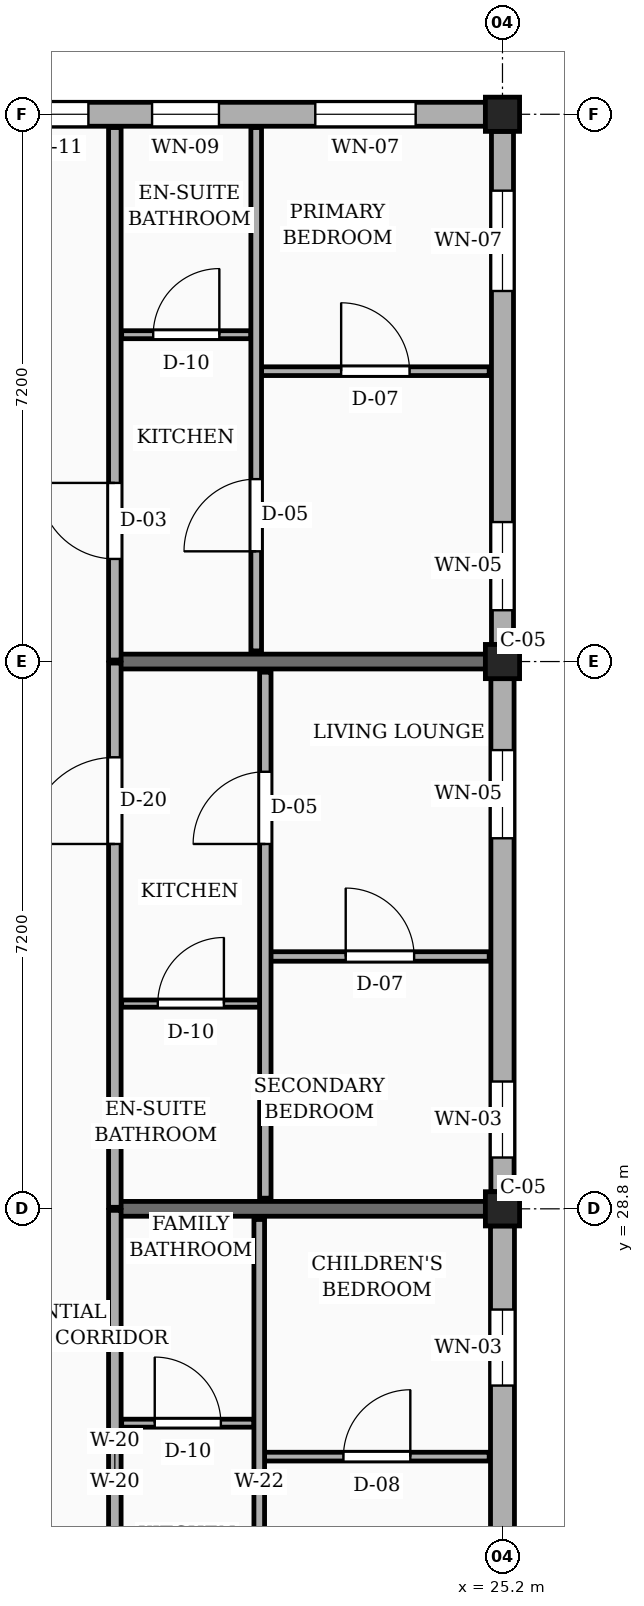
"""IFC4 building model, lengths in metres.
Left out: names, types, materials, properties, quantities, classifications, styles, units other than length and angle.
Written with IfcOpenShell. Run it as: python <this file> out.ifc"""

import sys

from ifc_helpers import new_model, si_unit, direction, frame, frame_2d, origin, origin_2d, place, context, subcontext, project, spatial, rectangle, extrude, element, fill, save


model = new_model("IFC4")
c1 = context("Model", 3, precision=1e-05, world=origin(), true_north=direction((0.0, 1.0)))
c2 = subcontext(c1, "Body", "Model", "MODEL_VIEW")
j1 = project(units=[si_unit("LENGTHUNIT", "METRE"), si_unit("PLANEANGLEUNIT", "RADIAN")], contexts=[c1])
p1 = place(None, origin())
s1 = spatial("IfcSite", under=j1, at=p1, CompositionType="ELEMENT")
p2 = place(p1, origin())
s2 = spatial("IfcBuilding", under=s1, at=p2, CompositionType="ELEMENT")
p3 = place(p2, frame((0.0, 0.0, 42.3)))
s3 = spatial("IfcBuildingStorey", under=s2, at=p3, CompositionType="ELEMENT", Elevation=42.3)
for number, where, z_axis, x_axis in (
    (1, (25.2, 28.8, 0.0), (0.0, 0.0, 1.0), (1.0, 0.0, 0.0)),
    (2, (25.2, 36.0, 0.0), (0.0, 0.0, 1.0), (1.0, 0.0, 0.0)),
    (3, (25.2, 43.2, 0.0), (0.0, 0.0, 1.0), (1.0, 0.0, 0.0)),
):
    element("IfcColumn", number, at=place(p3, frame(where, z_axis=z_axis, x_axis=x_axis)), inside=s3, PredefinedType="COLUMN", context=c2, shape_type="SweptSolid", body=[
        extrude(rectangle(XDim=0.45, YDim=0.45, at=origin_2d()), origin(), (0.0, 0.0, 1.0), 3.15),
    ])
for number, where, z_axis, x_axis in (
    (4, (20.1, 28.8, 0.0), (0.0, 0.0, 1.0), (1.0, 0.0, 0.0)),
    (5, (20.1, 36.0, 0.0), (0.0, 0.0, 1.0), (1.0, 0.0, 0.0)),
):
    element("IfcWall", number, at=place(p3, frame(where, z_axis=z_axis, x_axis=x_axis)), inside=s3, PredefinedType="SOLIDWALL", context=c2, shape_type="SweptSolid", body=[
        extrude(rectangle(XDim=4.875, YDim=0.195, at=frame_2d((2.438, 0.0))), origin(), (0.0, 0.0, 1.0), 2.17),
    ])
p4 = place(p3, frame((25.2, 21.825, 0.0), z_axis=(0.0, 0.0, 1.0), x_axis=(0.0, 1.0, 0.0)))
e6 = element("IfcWall", 6, at=p4, inside=s3, PredefinedType="SOLIDWALL", context=c2, shape_type="SweptSolid", body=[
    extrude(rectangle(XDim=6.75, YDim=0.315, at=frame_2d((3.375, 0.0))), origin(), (0.0, 0.0, 1.0), 2.44),
])
p5 = place(p4, frame((0.45, 0.0, 0.78)))
e7 = element("IfcOpeningElement", 7, at=p5, cuts=e6, PredefinedType="OPENING", context=c2, shape_type="SweptSolid", body=[
    extrude(rectangle(XDim=0.85, YDim=1.15, at=frame_2d((0.425, 0.575))), frame((0.0, 0.167, 0.0), z_axis=(0.0, -1.0, 0.0), x_axis=(1.0, 0.0, 0.0)), (0.0, 0.0, 1.0), 0.335),
])
p6 = place(p4, frame((4.65, 0.0, 0.78)))
e8 = element("IfcOpeningElement", 8, at=p6, cuts=e6, PredefinedType="OPENING", context=c2, shape_type="SweptSolid", body=[
    extrude(rectangle(XDim=1.0, YDim=1.15, at=frame_2d((0.5, 0.575))), frame((0.0, 0.167, 0.0), z_axis=(0.0, -1.0, 0.0), x_axis=(1.0, 0.0, 0.0)), (0.0, 0.0, 1.0), 0.335),
])
p7 = place(p3, frame((25.2, 29.025, 0.0), z_axis=(0.0, 0.0, 1.0), x_axis=(0.0, 1.0, 0.0)))
e9 = element("IfcWall", 9, at=p7, inside=s3, PredefinedType="SOLIDWALL", context=c2, shape_type="SweptSolid", body=[
    extrude(rectangle(XDim=6.75, YDim=0.305, at=frame_2d((3.375, 0.0))), origin(), (0.0, 0.0, 1.0), 2.44),
])
p8 = place(p7, frame((0.45, 0.0, 0.78)))
e10 = element("IfcOpeningElement", 10, at=p8, cuts=e9, PredefinedType="OPENING", context=c2, shape_type="SweptSolid", body=[
    extrude(rectangle(XDim=1.0, YDim=1.15, at=frame_2d((0.5, 0.575))), frame((0.0, 0.163, 0.0), z_axis=(0.0, -1.0, 0.0), x_axis=(1.0, 0.0, 0.0)), (0.0, 0.0, 1.0), 0.325),
])
p9 = place(p7, frame((4.65, 0.0, 0.78)))
e11 = element("IfcOpeningElement", 11, at=p9, cuts=e9, PredefinedType="OPENING", context=c2, shape_type="SweptSolid", body=[
    extrude(rectangle(XDim=1.16, YDim=1.15, at=frame_2d((0.58, 0.575))), frame((0.0, 0.163, 0.0), z_axis=(0.0, -1.0, 0.0), x_axis=(1.0, 0.0, 0.0)), (0.0, 0.0, 1.0), 0.325),
])
p10 = place(p3, frame((25.2, 36.225, 0.0), z_axis=(0.0, 0.0, 1.0), x_axis=(0.0, 1.0, 0.0)))
e12 = element("IfcWall", 12, at=p10, inside=s3, PredefinedType="SOLIDWALL", context=c2, shape_type="SweptSolid", body=[
    extrude(rectangle(XDim=6.75, YDim=0.29, at=frame_2d((3.375, 0.0))), origin(), (0.0, 0.0, 1.0), 2.44),
])
p11 = place(p10, frame((0.45, 0.0, 0.78)))
e13 = element("IfcOpeningElement", 13, at=p11, cuts=e12, PredefinedType="OPENING", context=c2, shape_type="SweptSolid", body=[
    extrude(rectangle(XDim=1.16, YDim=1.15, at=frame_2d((0.58, 0.575))), frame((0.0, 0.155, 0.0), z_axis=(0.0, -1.0, 0.0), x_axis=(1.0, 0.0, 0.0)), (0.0, 0.0, 1.0), 0.31),
])
p12 = place(p10, frame((4.65, 0.0, 0.78)))
e14 = element("IfcOpeningElement", 14, at=p12, cuts=e12, PredefinedType="OPENING", context=c2, shape_type="SweptSolid", body=[
    extrude(rectangle(XDim=1.32, YDim=1.15, at=frame_2d((0.66, 0.575))), frame((0.0, 0.155, 0.0), z_axis=(0.0, -1.0, 0.0), x_axis=(1.0, 0.0, 0.0)), (0.0, 0.0, 1.0), 0.31),
])
p13 = place(p3, frame((24.975, 43.2, 0.0), z_axis=(0.0, 0.0, 1.0), x_axis=(-1.0, 0.0, 0.0)))
e15 = element("IfcWall", 15, at=p13, inside=s3, PredefinedType="SOLIDWALL", context=c2, shape_type="SweptSolid", body=[
    extrude(rectangle(XDim=6.75, YDim=0.315, at=frame_2d((3.375, 0.0))), origin(), (0.0, 0.0, 1.0), 2.44),
])
p14 = place(p13, frame((0.917, 0.0, 0.78)))
e16 = element("IfcOpeningElement", 16, at=p14, cuts=e15, PredefinedType="OPENING", context=c2, shape_type="SweptSolid", body=[
    extrude(rectangle(XDim=1.32, YDim=1.15, at=frame_2d((0.66, 0.575))), frame((0.0, 0.167, 0.0), z_axis=(0.0, -1.0, 0.0), x_axis=(1.0, 0.0, 0.0)), (0.0, 0.0, 1.0), 0.335),
])
p15 = place(p13, frame((3.505, 0.0, 0.78)))
e17 = element("IfcOpeningElement", 17, at=p15, cuts=e15, PredefinedType="OPENING", context=c2, shape_type="SweptSolid", body=[
    extrude(rectangle(XDim=0.88, YDim=1.26, at=frame_2d((0.44, 0.63))), frame((0.0, 0.167, 0.0), z_axis=(0.0, -1.0, 0.0), x_axis=(1.0, 0.0, 0.0)), (0.0, 0.0, 1.0), 0.335),
])
p16 = place(p13, frame((5.222, 0.0, 0.78)))
e18 = element("IfcOpeningElement", 18, at=p16, cuts=e15, PredefinedType="OPENING", context=c2, shape_type="SweptSolid", body=[
    extrude(rectangle(XDim=1.04, YDim=1.26, at=frame_2d((0.52, 0.63))), frame((0.0, 0.167, 0.0), z_axis=(0.0, -1.0, 0.0), x_axis=(1.0, 0.0, 0.0)), (0.0, 0.0, 1.0), 0.335),
])
p17 = place(p3, frame((20.1, 21.62, 0.0), z_axis=(0.0, 0.0, 1.0), x_axis=(0.0, 1.0, 0.0)))
e19 = element("IfcWall", 19, at=p17, inside=s3, PredefinedType="PARTITIONING", context=c2, shape_type="SweptSolid", body=[
    extrude(rectangle(XDim=7.16, YDim=0.165, at=frame_2d((3.58, 0.0))), origin(), (0.0, 0.0, 1.0), 2.305),
])
p18 = place(p17, frame((1.33, 0.0, 0.0)))
e20 = element("IfcOpeningElement", 20, at=p18, cuts=e19, PredefinedType="OPENING", context=c2, shape_type="SweptSolid", body=[
    extrude(rectangle(XDim=0.94, YDim=2.12, at=frame_2d((0.47, 1.06))), frame((0.0, 0.093, 0.0), z_axis=(0.0, -1.0, 0.0), x_axis=(1.0, 0.0, 0.0)), (0.0, 0.0, 1.0), 0.185),
])
p19 = place(p3, frame((20.1, 28.82, 0.0), z_axis=(0.0, 0.0, 1.0), x_axis=(0.0, 1.0, 0.0)))
e21 = element("IfcWall", 21, at=p19, inside=s3, PredefinedType="PARTITIONING", context=c2, shape_type="SweptSolid", body=[
    extrude(rectangle(XDim=7.16, YDim=0.165, at=frame_2d((3.58, 0.0))), origin(), (0.0, 0.0, 1.0), 2.305),
])
p20 = place(p19, frame((4.78, 0.0, 0.0)))
e22 = element("IfcOpeningElement", 22, at=p20, cuts=e21, PredefinedType="OPENING", context=c2, shape_type="SweptSolid", body=[
    extrude(rectangle(XDim=1.14, YDim=2.18, at=frame_2d((0.57, 1.09))), frame((0.0, 0.093, 0.0), z_axis=(0.0, -1.0, 0.0), x_axis=(1.0, 0.0, 0.0)), (0.0, 0.0, 1.0), 0.185),
])
p21 = place(p3, frame((20.1, 36.02, 0.0), z_axis=(0.0, 0.0, 1.0), x_axis=(0.0, 1.0, 0.0)))
e23 = element("IfcWall", 23, at=p21, inside=s3, PredefinedType="PARTITIONING", context=c2, shape_type="SweptSolid", body=[
    extrude(rectangle(XDim=7.005, YDim=0.165, at=frame_2d((3.502, 0.0))), origin(), (0.0, 0.0, 1.0), 2.305),
])
p22 = place(p21, frame((1.33, 0.0, 0.0)))
e24 = element("IfcOpeningElement", 24, at=p22, cuts=e23, PredefinedType="OPENING", context=c2, shape_type="SweptSolid", body=[
    extrude(rectangle(XDim=1.0, YDim=2.15, at=frame_2d((0.5, 1.075))), frame((0.0, 0.093, 0.0), z_axis=(0.0, -1.0, 0.0), x_axis=(1.0, 0.0, 0.0)), (0.0, 0.0, 1.0), 0.185),
])
p23 = place(p3, frame((22.07, 25.54, 0.0), z_axis=(0.0, 0.0, 1.0), x_axis=(1.0, 0.0, 0.0)))
e25 = element("IfcWall", 25, at=p23, inside=s3, PredefinedType="PARTITIONING", context=c2, shape_type="SweptSolid", body=[
    extrude(rectangle(XDim=2.955, YDim=0.115, at=frame_2d((1.478, 0.0))), origin(), (0.0, 0.0, 1.0), 2.305),
])
p24 = place(p23, frame((1.038, 0.0, 0.0)))
e26 = element("IfcOpeningElement", 26, at=p24, cuts=e25, PredefinedType="OPENING", context=c2, shape_type="SweptSolid", body=[
    extrude(rectangle(XDim=0.88, YDim=2.08, at=frame_2d((0.44, 1.04))), frame((0.0, 0.067, 0.0), z_axis=(0.0, -1.0, 0.0), x_axis=(1.0, 0.0, 0.0)), (0.0, 0.0, 1.0), 0.135),
])
p25 = place(p3, frame((20.19, 25.98, 0.0), z_axis=(0.0, 0.0, 1.0), x_axis=(1.0, 0.0, 0.0)))
e27 = element("IfcWall", 27, at=p25, inside=s3, PredefinedType="PARTITIONING", context=c2, shape_type="SweptSolid", body=[
    extrude(rectangle(XDim=1.74, YDim=0.105, at=frame_2d((0.87, 0.0))), origin(), (0.0, 0.0, 1.0), 2.305),
])
p26 = place(p25, frame((0.435, 0.0, 0.0)))
e28 = element("IfcOpeningElement", 28, at=p26, cuts=e27, PredefinedType="OPENING", context=c2, shape_type="SweptSolid", body=[
    extrude(rectangle(XDim=0.87, YDim=2.05, at=frame_2d((0.435, 1.025))), frame((0.0, 0.062, 0.0), z_axis=(0.0, -1.0, 0.0), x_axis=(1.0, 0.0, 0.0)), (0.0, 0.0, 1.0), 0.125),
])
p27 = place(p3, frame((22.0, 21.74, 0.0), z_axis=(0.0, 0.0, 1.0), x_axis=(0.0, 1.0, 0.0)))
e29 = element("IfcWall", 29, at=p27, inside=s3, PredefinedType="PARTITIONING", context=c2, shape_type="SweptSolid", body=[
    extrude(rectangle(XDim=6.92, YDim=0.14, at=frame_2d((3.46, 0.0))), origin(), (0.0, 0.0, 1.0), 2.305),
])
p28 = place(p27, frame((1.31, 0.0, 0.0)))
e30 = element("IfcOpeningElement", 30, at=p28, cuts=e29, PredefinedType="OPENING", context=c2, shape_type="SweptSolid", body=[
    extrude(rectangle(XDim=0.92, YDim=2.1, at=frame_2d((0.46, 1.05))), frame((0.0, 0.08, 0.0), z_axis=(0.0, -1.0, 0.0), x_axis=(1.0, 0.0, 0.0)), (0.0, 0.0, 1.0), 0.16),
])
p29 = place(p3, frame((22.15, 32.12, 0.0), z_axis=(0.0, 0.0, 1.0), x_axis=(1.0, 0.0, 0.0)))
e31 = element("IfcWall", 31, at=p29, inside=s3, PredefinedType="PARTITIONING", context=c2, shape_type="SweptSolid", body=[
    extrude(rectangle(XDim=2.875, YDim=0.125, at=frame_2d((1.438, 0.0))), origin(), (0.0, 0.0, 1.0), 2.305),
])
p30 = place(p29, frame((0.988, 0.0, 0.0)))
e32 = element("IfcOpeningElement", 32, at=p30, cuts=e31, PredefinedType="OPENING", context=c2, shape_type="SweptSolid", body=[
    extrude(rectangle(XDim=0.9, YDim=2.1, at=frame_2d((0.45, 1.05))), frame((0.0, 0.073, 0.0), z_axis=(0.0, -1.0, 0.0), x_axis=(1.0, 0.0, 0.0)), (0.0, 0.0, 1.0), 0.145),
])
p31 = place(p3, frame((20.19, 31.5, 0.0), z_axis=(0.0, 0.0, 1.0), x_axis=(1.0, 0.0, 0.0)))
e33 = element("IfcWall", 33, at=p31, inside=s3, PredefinedType="PARTITIONING", context=c2, shape_type="SweptSolid", body=[
    extrude(rectangle(XDim=1.82, YDim=0.095, at=frame_2d((0.91, 0.0))), origin(), (0.0, 0.0, 1.0), 2.305),
])
p32 = place(p31, frame((0.475, 0.0, 0.0)))
e34 = element("IfcOpeningElement", 34, at=p32, cuts=e33, PredefinedType="OPENING", context=c2, shape_type="SweptSolid", body=[
    extrude(rectangle(XDim=0.87, YDim=2.05, at=frame_2d((0.435, 1.025))), frame((0.0, 0.058, 0.0), z_axis=(0.0, -1.0, 0.0), x_axis=(1.0, 0.0, 0.0)), (0.0, 0.0, 1.0), 0.115),
])
p33 = place(p3, frame((22.08, 28.94, 0.0), z_axis=(0.0, 0.0, 1.0), x_axis=(0.0, 1.0, 0.0)))
e35 = element("IfcWall", 35, at=p33, inside=s3, PredefinedType="PARTITIONING", context=c2, shape_type="SweptSolid", body=[
    extrude(rectangle(XDim=6.92, YDim=0.15, at=frame_2d((3.46, 0.0))), origin(), (0.0, 0.0, 1.0), 2.305),
])
p34 = place(p33, frame((4.66, 0.0, 0.0)))
e36 = element("IfcOpeningElement", 36, at=p34, cuts=e35, PredefinedType="OPENING", context=c2, shape_type="SweptSolid", body=[
    extrude(rectangle(XDim=0.95, YDim=2.1, at=frame_2d((0.475, 1.05))), frame((0.0, 0.085, 0.0), z_axis=(0.0, -1.0, 0.0), x_axis=(1.0, 0.0, 0.0)), (0.0, 0.0, 1.0), 0.17),
])
p35 = place(p3, frame((22.03, 39.82, 0.0), z_axis=(0.0, 0.0, 1.0), x_axis=(1.0, 0.0, 0.0)))
e37 = element("IfcWall", 37, at=p35, inside=s3, PredefinedType="PARTITIONING", context=c2, shape_type="SweptSolid", body=[
    extrude(rectangle(XDim=2.995, YDim=0.115, at=frame_2d((1.498, 0.0))), origin(), (0.0, 0.0, 1.0), 2.305),
])
p36 = place(p35, frame((1.048, 0.0, 0.0)))
e38 = element("IfcOpeningElement", 38, at=p36, cuts=e37, PredefinedType="OPENING", context=c2, shape_type="SweptSolid", body=[
    extrude(rectangle(XDim=0.9, YDim=2.1, at=frame_2d((0.45, 1.05))), frame((0.0, 0.067, 0.0), z_axis=(0.0, -1.0, 0.0), x_axis=(1.0, 0.0, 0.0)), (0.0, 0.0, 1.0), 0.135),
])
p37 = place(p3, frame((20.19, 40.3, 0.0), z_axis=(0.0, 0.0, 1.0), x_axis=(1.0, 0.0, 0.0)))
e39 = element("IfcWall", 39, at=p37, inside=s3, PredefinedType="PARTITIONING", context=c2, shape_type="SweptSolid", body=[
    extrude(rectangle(XDim=1.7, YDim=0.105, at=frame_2d((0.85, 0.0))), origin(), (0.0, 0.0, 1.0), 2.305),
])
p38 = place(p37, frame((0.415, 0.0, 0.0)))
e40 = element("IfcOpeningElement", 40, at=p38, cuts=e39, PredefinedType="OPENING", context=c2, shape_type="SweptSolid", body=[
    extrude(rectangle(XDim=0.87, YDim=2.05, at=frame_2d((0.435, 1.025))), frame((0.0, 0.062, 0.0), z_axis=(0.0, -1.0, 0.0), x_axis=(1.0, 0.0, 0.0)), (0.0, 0.0, 1.0), 0.125),
])
p39 = place(p3, frame((21.96, 36.14, 0.0), z_axis=(0.0, 0.0, 1.0), x_axis=(0.0, 1.0, 0.0)))
e41 = element("IfcWall", 41, at=p39, inside=s3, PredefinedType="PARTITIONING", context=c2, shape_type="SweptSolid", body=[
    extrude(rectangle(XDim=6.885, YDim=0.14, at=frame_2d((3.442, 0.0))), origin(), (0.0, 0.0, 1.0), 2.305),
])
p40 = place(p39, frame((1.31, 0.0, 0.0)))
e42 = element("IfcOpeningElement", 42, at=p40, cuts=e41, PredefinedType="OPENING", context=c2, shape_type="SweptSolid", body=[
    extrude(rectangle(XDim=0.95, YDim=2.1, at=frame_2d((0.475, 1.05))), frame((0.0, 0.08, 0.0), z_axis=(0.0, -1.0, 0.0), x_axis=(1.0, 0.0, 0.0)), (0.0, 0.0, 1.0), 0.16),
])
p41 = place(p6, origin())
e43 = element("IfcWindow", 43, at=p41, inside=s3, PartitioningType="SINGLE_PANEL", PredefinedType="WINDOW", context=c2, shape_type="SweptSolid", body=[
    extrude(rectangle(XDim=1.0, YDim=1.15, at=frame_2d((0.5, 0.575))), frame((0.0, 0.03, 0.0), z_axis=(0.0, -1.0, 0.0), x_axis=(1.0, 0.0, 0.0)), (0.0, 0.0, 1.0), 0.06),
])
fill(e8, e43)
p42 = place(p8, origin())
e44 = element("IfcWindow", 44, at=p42, inside=s3, PartitioningType="SINGLE_PANEL", PredefinedType="WINDOW", context=c2, shape_type="SweptSolid", body=[
    extrude(rectangle(XDim=1.0, YDim=1.15, at=frame_2d((0.5, 0.575))), frame((0.0, 0.03, 0.0), z_axis=(0.0, -1.0, 0.0), x_axis=(1.0, 0.0, 0.0)), (0.0, 0.0, 1.0), 0.06),
])
fill(e10, e44)
p43 = place(p9, origin())
e45 = element("IfcWindow", 45, at=p43, inside=s3, PartitioningType="SINGLE_PANEL", PredefinedType="WINDOW", context=c2, shape_type="SweptSolid", body=[
    extrude(rectangle(XDim=1.16, YDim=1.15, at=frame_2d((0.58, 0.575))), frame((0.0, 0.03, 0.0), z_axis=(0.0, -1.0, 0.0), x_axis=(1.0, 0.0, 0.0)), (0.0, 0.0, 1.0), 0.06),
])
fill(e11, e45)
p44 = place(p11, origin())
e46 = element("IfcWindow", 46, at=p44, inside=s3, PartitioningType="SINGLE_PANEL", PredefinedType="WINDOW", context=c2, shape_type="SweptSolid", body=[
    extrude(rectangle(XDim=1.16, YDim=1.15, at=frame_2d((0.58, 0.575))), frame((0.0, 0.03, 0.0), z_axis=(0.0, -1.0, 0.0), x_axis=(1.0, 0.0, 0.0)), (0.0, 0.0, 1.0), 0.06),
])
fill(e13, e46)
p45 = place(p12, origin())
e47 = element("IfcWindow", 47, at=p45, inside=s3, PartitioningType="SINGLE_PANEL", PredefinedType="WINDOW", context=c2, shape_type="SweptSolid", body=[
    extrude(rectangle(XDim=1.32, YDim=1.15, at=frame_2d((0.66, 0.575))), frame((0.0, 0.03, 0.0), z_axis=(0.0, -1.0, 0.0), x_axis=(1.0, 0.0, 0.0)), (0.0, 0.0, 1.0), 0.06),
])
fill(e14, e47)
p46 = place(p14, origin())
e48 = element("IfcWindow", 48, at=p46, inside=s3, PartitioningType="SINGLE_PANEL", PredefinedType="WINDOW", context=c2, shape_type="SweptSolid", body=[
    extrude(rectangle(XDim=1.32, YDim=1.15, at=frame_2d((0.66, 0.575))), frame((0.0, 0.03, 0.0), z_axis=(0.0, -1.0, 0.0), x_axis=(1.0, 0.0, 0.0)), (0.0, 0.0, 1.0), 0.06),
])
fill(e16, e48)
p47 = place(p15, origin())
e49 = element("IfcWindow", 49, at=p47, inside=s3, PartitioningType="SINGLE_PANEL", PredefinedType="WINDOW", context=c2, shape_type="SweptSolid", body=[
    extrude(rectangle(XDim=0.88, YDim=1.26, at=frame_2d((0.44, 0.63))), frame((0.0, 0.03, 0.0), z_axis=(0.0, -1.0, 0.0), x_axis=(1.0, 0.0, 0.0)), (0.0, 0.0, 1.0), 0.06),
])
fill(e17, e49)
p48 = place(p16, origin())
e50 = element("IfcWindow", 50, at=p48, inside=s3, PartitioningType="SINGLE_PANEL", PredefinedType="WINDOW", context=c2, shape_type="SweptSolid", body=[
    extrude(rectangle(XDim=1.04, YDim=1.26, at=frame_2d((0.52, 0.63))), frame((0.0, 0.03, 0.0), z_axis=(0.0, -1.0, 0.0), x_axis=(1.0, 0.0, 0.0)), (0.0, 0.0, 1.0), 0.06),
])
fill(e18, e50)
p49 = place(p20, origin())
e51 = element("IfcDoor", 51, at=p49, inside=s3, OperationType="SINGLE_SWING_LEFT", PredefinedType="DOOR", context=c2, shape_type="SweptSolid", body=[
    extrude(rectangle(XDim=1.14, YDim=2.18, at=frame_2d((0.57, 1.09))), frame((0.0, 0.025, 0.0), z_axis=(0.0, -1.0, 0.0), x_axis=(1.0, 0.0, 0.0)), (0.0, 0.0, 1.0), 0.05),
])
fill(e22, e51)
p50 = place(p22, origin())
e52 = element("IfcDoor", 52, at=p50, inside=s3, OperationType="SINGLE_SWING_RIGHT", PredefinedType="DOOR", context=c2, shape_type="SweptSolid", body=[
    extrude(rectangle(XDim=1.0, YDim=2.15, at=frame_2d((0.5, 1.075))), frame((0.0, 0.025, 0.0), z_axis=(0.0, -1.0, 0.0), x_axis=(1.0, 0.0, 0.0)), (0.0, 0.0, 1.0), 0.05),
])
fill(e24, e52)
p51 = place(p24, origin())
e53 = element("IfcDoor", 53, at=p51, inside=s3, OperationType="SINGLE_SWING_RIGHT", PredefinedType="DOOR", context=c2, shape_type="SweptSolid", body=[
    extrude(rectangle(XDim=0.88, YDim=2.08, at=frame_2d((0.44, 1.04))), frame((0.0, 0.025, 0.0), z_axis=(0.0, -1.0, 0.0), x_axis=(1.0, 0.0, 0.0)), (0.0, 0.0, 1.0), 0.05),
])
fill(e26, e53)
p52 = place(p26, origin())
e54 = element("IfcDoor", 54, at=p52, inside=s3, OperationType="SINGLE_SWING_LEFT", PredefinedType="DOOR", context=c2, shape_type="SweptSolid", body=[
    extrude(rectangle(XDim=0.87, YDim=2.05, at=frame_2d((0.435, 1.025))), frame((0.0, 0.025, 0.0), z_axis=(0.0, -1.0, 0.0), x_axis=(1.0, 0.0, 0.0)), (0.0, 0.0, 1.0), 0.05),
])
fill(e28, e54)
p53 = place(p30, origin())
e55 = element("IfcDoor", 55, at=p53, inside=s3, OperationType="SINGLE_SWING_LEFT", PredefinedType="DOOR", context=c2, shape_type="SweptSolid", body=[
    extrude(rectangle(XDim=0.9, YDim=2.1, at=frame_2d((0.45, 1.05))), frame((0.0, 0.025, 0.0), z_axis=(0.0, -1.0, 0.0), x_axis=(1.0, 0.0, 0.0)), (0.0, 0.0, 1.0), 0.05),
])
fill(e32, e55)
p54 = place(p32, origin())
e56 = element("IfcDoor", 56, at=p54, inside=s3, OperationType="SINGLE_SWING_RIGHT", PredefinedType="DOOR", context=c2, shape_type="SweptSolid", body=[
    extrude(rectangle(XDim=0.87, YDim=2.05, at=frame_2d((0.435, 1.025))), frame((0.0, 0.025, 0.0), z_axis=(0.0, -1.0, 0.0), x_axis=(1.0, 0.0, 0.0)), (0.0, 0.0, 1.0), 0.05),
])
fill(e34, e56)
p55 = place(p34, origin())
e57 = element("IfcDoor", 57, at=p55, inside=s3, OperationType="SINGLE_SWING_LEFT", PredefinedType="DOOR", context=c2, shape_type="SweptSolid", body=[
    extrude(rectangle(XDim=0.95, YDim=2.1, at=frame_2d((0.475, 1.05))), frame((0.0, 0.025, 0.0), z_axis=(0.0, -1.0, 0.0), x_axis=(1.0, 0.0, 0.0)), (0.0, 0.0, 1.0), 0.05),
])
fill(e36, e57)
p56 = place(p36, origin())
e58 = element("IfcDoor", 58, at=p56, inside=s3, OperationType="SINGLE_SWING_LEFT", PredefinedType="DOOR", context=c2, shape_type="SweptSolid", body=[
    extrude(rectangle(XDim=0.9, YDim=2.1, at=frame_2d((0.45, 1.05))), frame((0.0, 0.025, 0.0), z_axis=(0.0, -1.0, 0.0), x_axis=(1.0, 0.0, 0.0)), (0.0, 0.0, 1.0), 0.05),
])
fill(e38, e58)
p57 = place(p38, origin())
e59 = element("IfcDoor", 59, at=p57, inside=s3, OperationType="SINGLE_SWING_RIGHT", PredefinedType="DOOR", context=c2, shape_type="SweptSolid", body=[
    extrude(rectangle(XDim=0.87, YDim=2.05, at=frame_2d((0.435, 1.025))), frame((0.0, 0.025, 0.0), z_axis=(0.0, -1.0, 0.0), x_axis=(1.0, 0.0, 0.0)), (0.0, 0.0, 1.0), 0.05),
])
fill(e40, e59)
p58 = place(p40, origin())
e60 = element("IfcDoor", 60, at=p58, inside=s3, OperationType="SINGLE_SWING_LEFT", PredefinedType="DOOR", context=c2, shape_type="SweptSolid", body=[
    extrude(rectangle(XDim=0.95, YDim=2.1, at=frame_2d((0.475, 1.05))), frame((0.0, 0.025, 0.0), z_axis=(0.0, -1.0, 0.0), x_axis=(1.0, 0.0, 0.0)), (0.0, 0.0, 1.0), 0.05),
])
fill(e42, e60)
save(model, sys.argv[1])
